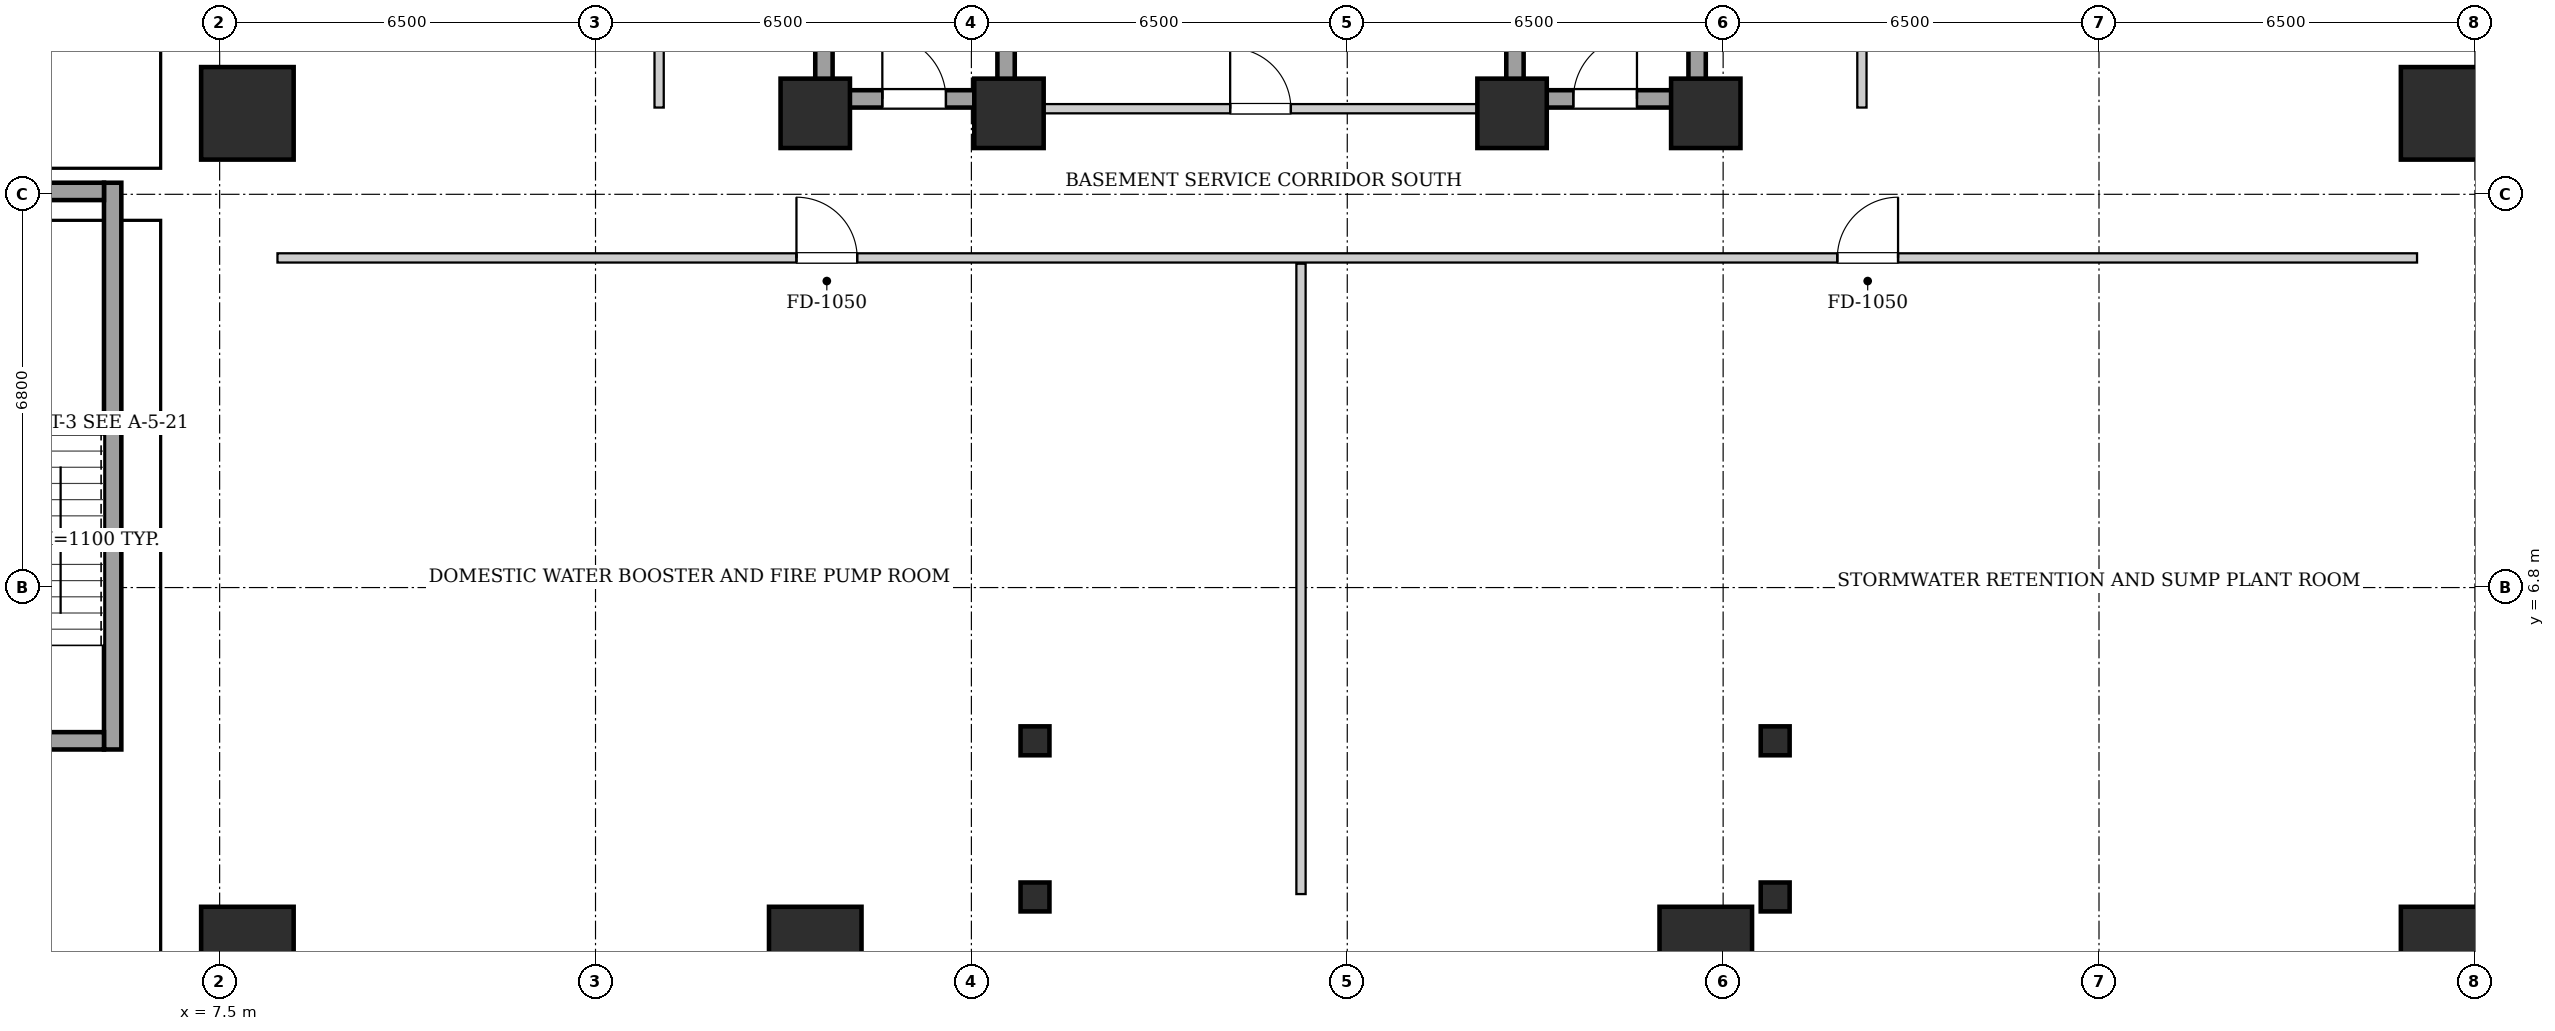
"""IFC4 building model, lengths in metres.
Left out: names, types, materials, properties, quantities, classifications, styles, units other than length and angle.
Written with IfcOpenShell. Run it as: python <this file> out.ifc"""

import sys

from ifc_helpers import new_model, si_unit, direction, frame, frame_2d, origin, origin_2d, place, context, subcontext, project, spatial, rectangle, extrude, element, fill, save


model = new_model("IFC4")
c1 = context("Model", 3, precision=1e-05, world=origin(), true_north=direction((0.0, 1.0)))
c2 = subcontext(c1, "Body", "Model", "MODEL_VIEW")
j1 = project(units=[si_unit("LENGTHUNIT", "METRE"), si_unit("PLANEANGLEUNIT", "RADIAN")], contexts=[c1])
p1 = place(None, origin())
s1 = spatial("IfcSite", under=j1, at=p1, CompositionType="ELEMENT")
p2 = place(p1, origin())
s2 = spatial("IfcBuilding", under=s1, at=p2, CompositionType="ELEMENT")
p3 = place(p2, frame((0.0, 0.0, -9.6)))
s3 = spatial("IfcBuildingStorey", under=s2, at=p3, CompositionType="ELEMENT", Elevation=-9.6)
for number, where, z_axis, x_axis in (
    (1, (21.6, 1.45, 0.0), (0.0, 0.0, 1.0), (1.0, 0.0, 0.0)),
    (2, (21.6, 4.15, 0.0), (0.0, 0.0, 1.0), (1.0, 0.0, 0.0)),
    (3, (34.4, 1.45, 0.0), (0.0, 0.0, 1.0), (1.0, 0.0, 0.0)),
    (4, (34.4, 4.15, 0.0), (0.0, 0.0, 1.0), (1.0, 0.0, 0.0)),
):
    element("IfcColumn", number, at=place(p3, frame(where, z_axis=z_axis, x_axis=x_axis)), inside=s3, PredefinedType="COLUMN", context=c2, shape_type="SweptSolid", body=[
        extrude(rectangle(XDim=0.5, YDim=0.5, at=origin_2d()), origin(), (0.0, 0.0, 1.0), 4.8),
    ])
for number, where, z_axis, x_axis in (
    (5, (7.98, 0.48, 0.0), (0.0, 0.0, 1.0), (1.0, 0.0, 0.0)),
    (6, (7.98, 15.0, 0.0), (0.0, 0.0, 1.0), (1.0, 0.0, 0.0)),
    (7, (46.02, 0.48, 0.0), (0.0, 0.0, 1.0), (1.0, 0.0, 0.0)),
    (8, (46.02, 15.0, 0.0), (0.0, 0.0, 1.0), (1.0, 0.0, 0.0)),
    (9, (17.8, 0.48, 0.0), (0.0, 0.0, 1.0), (1.0, 0.0, 0.0)),
    (10, (33.2, 0.48, 0.0), (0.0, 0.0, 1.0), (1.0, 0.0, 0.0)),
):
    element("IfcColumn", number, at=place(p3, frame(where, z_axis=z_axis, x_axis=x_axis)), inside=s3, PredefinedType="COLUMN", context=c2, shape_type="SweptSolid", body=[
        extrude(rectangle(XDim=1.6, YDim=1.6, at=origin_2d()), origin(), (0.0, 0.0, 1.0), 4.8),
    ])
for number, where, z_axis, x_axis in (
    (11, (17.8, 15.0, 0.0), (0.0, 0.0, 1.0), (1.0, 0.0, 0.0)),
    (12, (21.15, 15.0, 0.0), (0.0, 0.0, 1.0), (1.0, 0.0, 0.0)),
    (13, (29.85, 15.0, 0.0), (0.0, 0.0, 1.0), (1.0, 0.0, 0.0)),
    (14, (33.2, 15.0, 0.0), (0.0, 0.0, 1.0), (1.0, 0.0, 0.0)),
):
    element("IfcColumn", number, at=place(p3, frame(where, z_axis=z_axis, x_axis=x_axis)), inside=s3, PredefinedType="COLUMN", context=c2, shape_type="SweptSolid", body=[
        extrude(rectangle(XDim=1.2, YDim=1.2, at=origin_2d()), origin(), (0.0, 0.0, 1.0), 4.8),
    ])
for number, where, z_axis, x_axis in (
    (15, (17.95, 15.1, 0.0), (0.0, 0.0, 1.0), (0.0, 1.0, 0.0)),
    (16, (21.1, 15.1, 0.0), (0.0, 0.0, 1.0), (0.0, 1.0, 0.0)),
):
    element("IfcWall", number, at=place(p3, frame(where, z_axis=z_axis, x_axis=x_axis)), inside=s3, PredefinedType="SHEAR", context=c2, shape_type="SweptSolid", body=[
        extrude(rectangle(XDim=9.0, YDim=0.3, at=frame_2d((4.5, 0.0))), origin(), (0.0, 0.0, 1.0), 4.48),
    ])
p4 = place(p3, frame((18.1, 15.25, 0.0), z_axis=(0.0, 0.0, 1.0), x_axis=(1.0, 0.0, 0.0)))
e17 = element("IfcWall", 17, at=p4, inside=s3, PredefinedType="SHEAR", context=c2, shape_type="SweptSolid", body=[
    extrude(rectangle(XDim=2.85, YDim=0.3, at=frame_2d((1.425, 0.0))), origin(), (0.0, 0.0, 1.0), 4.48),
])
p5 = place(p4, frame((0.86, 0.0, 0.0)))
e18 = element("IfcOpeningElement", 18, at=p5, cuts=e17, PredefinedType="OPENING", context=c2, shape_type="SweptSolid", body=[
    extrude(rectangle(XDim=1.1, YDim=2.05, at=frame_2d((0.55, 1.025))), frame((0.0, 0.16, 0.0), z_axis=(0.0, -1.0, 0.0), x_axis=(1.0, 0.0, 0.0)), (0.0, 0.0, 1.0), 0.32),
])
for number, where, z_axis, x_axis in (
    (19, (29.9, 15.1, 0.0), (0.0, 0.0, 1.0), (0.0, 1.0, 0.0)),
    (20, (33.05, 15.1, 0.0), (0.0, 0.0, 1.0), (0.0, 1.0, 0.0)),
):
    element("IfcWall", number, at=place(p3, frame(where, z_axis=z_axis, x_axis=x_axis)), inside=s3, PredefinedType="SHEAR", context=c2, shape_type="SweptSolid", body=[
        extrude(rectangle(XDim=9.0, YDim=0.3, at=frame_2d((4.5, 0.0))), origin(), (0.0, 0.0, 1.0), 4.48),
    ])
p6 = place(p3, frame((30.05, 15.25, 0.0), z_axis=(0.0, 0.0, 1.0), x_axis=(1.0, 0.0, 0.0)))
e21 = element("IfcWall", 21, at=p6, inside=s3, PredefinedType="SHEAR", context=c2, shape_type="SweptSolid", body=[
    extrude(rectangle(XDim=2.85, YDim=0.3, at=frame_2d((1.425, 0.0))), origin(), (0.0, 0.0, 1.0), 4.48),
])
p7 = place(p6, frame((0.86, 0.0, 0.0)))
e22 = element("IfcOpeningElement", 22, at=p7, cuts=e21, PredefinedType="OPENING", context=c2, shape_type="SweptSolid", body=[
    extrude(rectangle(XDim=1.1, YDim=2.05, at=frame_2d((0.55, 1.025))), frame((0.0, 0.16, 0.0), z_axis=(0.0, -1.0, 0.0), x_axis=(1.0, 0.0, 0.0)), (0.0, 0.0, 1.0), 0.32),
])
p8 = place(p3, frame((5.65, 4.0, 0.0), z_axis=(0.0, 0.0, 1.0), x_axis=(0.0, 1.0, 0.0)))
e23 = element("IfcWall", 23, at=p8, inside=s3, PredefinedType="SHEAR", context=c2, shape_type="SweptSolid", body=[
    extrude(rectangle(XDim=9.8, YDim=0.3, at=frame_2d((4.9, 0.0))), origin(), (0.0, 0.0, 1.0), 4.48),
])
p9 = place(p3, frame((2.35, 13.65, 0.0), z_axis=(0.0, 0.0, 1.0), x_axis=(1.0, 0.0, 0.0)))
e24 = element("IfcWall", 24, at=p9, inside=s3, PredefinedType="SHEAR", context=c2, shape_type="SweptSolid", body=[
    extrude(rectangle(XDim=3.15, YDim=0.3, at=frame_2d((1.575, 0.0))), origin(), (0.0, 0.0, 1.0), 4.48),
])
p10 = place(p3, frame((2.35, 4.15, 0.0), z_axis=(0.0, 0.0, 1.0), x_axis=(1.0, 0.0, 0.0)))
e25 = element("IfcWall", 25, at=p10, inside=s3, PredefinedType="SHEAR", context=c2, shape_type="SweptSolid", body=[
    extrude(rectangle(XDim=3.15, YDim=0.3, at=frame_2d((1.575, 0.0))), origin(), (0.0, 0.0, 1.0), 4.48),
])
p11 = place(p10, frame((1.02, 0.0, 0.0)))
e26 = element("IfcOpeningElement", 26, at=p11, cuts=e25, PredefinedType="OPENING", context=c2, shape_type="SweptSolid", body=[
    extrude(rectangle(XDim=1.1, YDim=2.05, at=frame_2d((0.55, 1.025))), frame((0.0, 0.16, 0.0), z_axis=(0.0, -1.0, 0.0), x_axis=(1.0, 0.0, 0.0)), (0.0, 0.0, 1.0), 0.32),
])
p12 = place(p3, frame((21.25, 15.08, 0.0), z_axis=(0.0, 0.0, 1.0), x_axis=(1.0, 0.0, 0.0)))
e27 = element("IfcWall", 27, at=p12, inside=s3, PredefinedType="PARTITIONING", context=c2, shape_type="SweptSolid", body=[
    extrude(rectangle(XDim=8.5, YDim=0.16, at=frame_2d((4.25, 0.0))), origin(), (0.0, 0.0, 1.0), 4.48),
])
p13 = place(p12, frame((3.725, 0.0, 0.0)))
e28 = element("IfcOpeningElement", 28, at=p13, cuts=e27, PredefinedType="OPENING", context=c2, shape_type="SweptSolid", body=[
    extrude(rectangle(XDim=1.05, YDim=2.05, at=frame_2d((0.525, 1.025))), frame((0.0, 0.09, 0.0), z_axis=(0.0, -1.0, 0.0), x_axis=(1.0, 0.0, 0.0)), (0.0, 0.0, 1.0), 0.18),
])
p14 = place(p3, frame((8.5, 12.5, 0.0), z_axis=(0.0, 0.0, 1.0), x_axis=(1.0, 0.0, 0.0)))
e29 = element("IfcWall", 29, at=p14, inside=s3, PredefinedType="PARTITIONING", context=c2, shape_type="SweptSolid", body=[
    extrude(rectangle(XDim=37.0, YDim=0.16, at=frame_2d((18.5, 0.0))), origin(), (0.0, 0.0, 1.0), 4.48),
])
p15 = place(p14, frame((8.975, 0.0, 0.0)))
e30 = element("IfcOpeningElement", 30, at=p15, cuts=e29, PredefinedType="OPENING", context=c2, shape_type="SweptSolid", body=[
    extrude(rectangle(XDim=1.05, YDim=2.05, at=frame_2d((0.525, 1.025))), frame((0.0, 0.09, 0.0), z_axis=(0.0, -1.0, 0.0), x_axis=(1.0, 0.0, 0.0)), (0.0, 0.0, 1.0), 0.18),
])
p16 = place(p14, frame((26.975, 0.0, 0.0)))
e31 = element("IfcOpeningElement", 31, at=p16, cuts=e29, PredefinedType="OPENING", context=c2, shape_type="SweptSolid", body=[
    extrude(rectangle(XDim=1.05, YDim=2.05, at=frame_2d((0.525, 1.025))), frame((0.0, 0.09, 0.0), z_axis=(0.0, -1.0, 0.0), x_axis=(1.0, 0.0, 0.0)), (0.0, 0.0, 1.0), 0.18),
])
p17 = place(p3, frame((26.2, 1.5, 0.0), z_axis=(0.0, 0.0, 1.0), x_axis=(0.0, 1.0, 0.0)))
e32 = element("IfcWall", 32, at=p17, inside=s3, PredefinedType="PARTITIONING", context=c2, shape_type="SweptSolid", body=[
    extrude(rectangle(XDim=10.9, YDim=0.16, at=frame_2d((5.45, 0.0))), origin(), (0.0, 0.0, 1.0), 4.48),
])
p18 = place(p3, frame((15.1, 15.1, 0.0), z_axis=(0.0, 0.0, 1.0), x_axis=(0.0, 1.0, 0.0)))
e33 = element("IfcWall", 33, at=p18, inside=s3, PredefinedType="PARTITIONING", context=c2, shape_type="SweptSolid", body=[
    extrude(rectangle(XDim=13.8, YDim=0.16, at=frame_2d((6.9, 0.0))), origin(), (0.0, 0.0, 1.0), 4.48),
])
p19 = place(p18, frame((6.475, 0.0, 0.0)))
e34 = element("IfcOpeningElement", 34, at=p19, cuts=e33, PredefinedType="OPENING", context=c2, shape_type="SweptSolid", body=[
    extrude(rectangle(XDim=1.05, YDim=2.05, at=frame_2d((0.525, 1.025))), frame((0.0, 0.09, 0.0), z_axis=(0.0, -1.0, 0.0), x_axis=(1.0, 0.0, 0.0)), (0.0, 0.0, 1.0), 0.18),
])
p20 = place(p3, frame((35.9, 15.1, 0.0), z_axis=(0.0, 0.0, 1.0), x_axis=(0.0, 1.0, 0.0)))
e35 = element("IfcWall", 35, at=p20, inside=s3, PredefinedType="PARTITIONING", context=c2, shape_type="SweptSolid", body=[
    extrude(rectangle(XDim=13.8, YDim=0.16, at=frame_2d((6.9, 0.0))), origin(), (0.0, 0.0, 1.0), 4.48),
])
p21 = place(p20, frame((6.475, 0.0, 0.0)))
e36 = element("IfcOpeningElement", 36, at=p21, cuts=e35, PredefinedType="OPENING", context=c2, shape_type="SweptSolid", body=[
    extrude(rectangle(XDim=1.05, YDim=2.05, at=frame_2d((0.525, 1.025))), frame((0.0, 0.09, 0.0), z_axis=(0.0, -1.0, 0.0), x_axis=(1.0, 0.0, 0.0)), (0.0, 0.0, 1.0), 0.18),
])
p22 = place(p5, origin())
e37 = element("IfcDoor", 37, at=p22, inside=s3, OperationType="SINGLE_SWING_LEFT", PredefinedType="DOOR", context=c2, shape_type="SweptSolid", body=[
    extrude(rectangle(XDim=1.1, YDim=2.05, at=frame_2d((0.55, 1.025))), frame((0.0, 0.025, 0.0), z_axis=(0.0, -1.0, 0.0), x_axis=(1.0, 0.0, 0.0)), (0.0, 0.0, 1.0), 0.05),
])
fill(e18, e37)
p23 = place(p7, origin())
e38 = element("IfcDoor", 38, at=p23, inside=s3, OperationType="SINGLE_SWING_RIGHT", PredefinedType="DOOR", context=c2, shape_type="SweptSolid", body=[
    extrude(rectangle(XDim=1.1, YDim=2.05, at=frame_2d((0.55, 1.025))), frame((0.0, 0.025, 0.0), z_axis=(0.0, -1.0, 0.0), x_axis=(1.0, 0.0, 0.0)), (0.0, 0.0, 1.0), 0.05),
])
fill(e22, e38)
p24 = place(p13, origin())
e39 = element("IfcDoor", 39, at=p24, inside=s3, OperationType="SINGLE_SWING_LEFT", PredefinedType="DOOR", context=c2, shape_type="SweptSolid", body=[
    extrude(rectangle(XDim=1.05, YDim=2.05, at=frame_2d((0.525, 1.025))), frame((0.0, 0.025, 0.0), z_axis=(0.0, -1.0, 0.0), x_axis=(1.0, 0.0, 0.0)), (0.0, 0.0, 1.0), 0.05),
])
fill(e28, e39)
p25 = place(p15, origin())
e40 = element("IfcDoor", 40, at=p25, inside=s3, OperationType="SINGLE_SWING_LEFT", PredefinedType="DOOR", context=c2, shape_type="SweptSolid", body=[
    extrude(rectangle(XDim=1.05, YDim=2.05, at=frame_2d((0.525, 1.025))), frame((0.0, 0.025, 0.0), z_axis=(0.0, -1.0, 0.0), x_axis=(1.0, 0.0, 0.0)), (0.0, 0.0, 1.0), 0.05),
])
fill(e30, e40)
p26 = place(p16, origin())
e41 = element("IfcDoor", 41, at=p26, inside=s3, OperationType="SINGLE_SWING_RIGHT", PredefinedType="DOOR", context=c2, shape_type="SweptSolid", body=[
    extrude(rectangle(XDim=1.05, YDim=2.05, at=frame_2d((0.525, 1.025))), frame((0.0, 0.025, 0.0), z_axis=(0.0, -1.0, 0.0), x_axis=(1.0, 0.0, 0.0)), (0.0, 0.0, 1.0), 0.05),
])
fill(e31, e41)
save(model, sys.argv[1])
